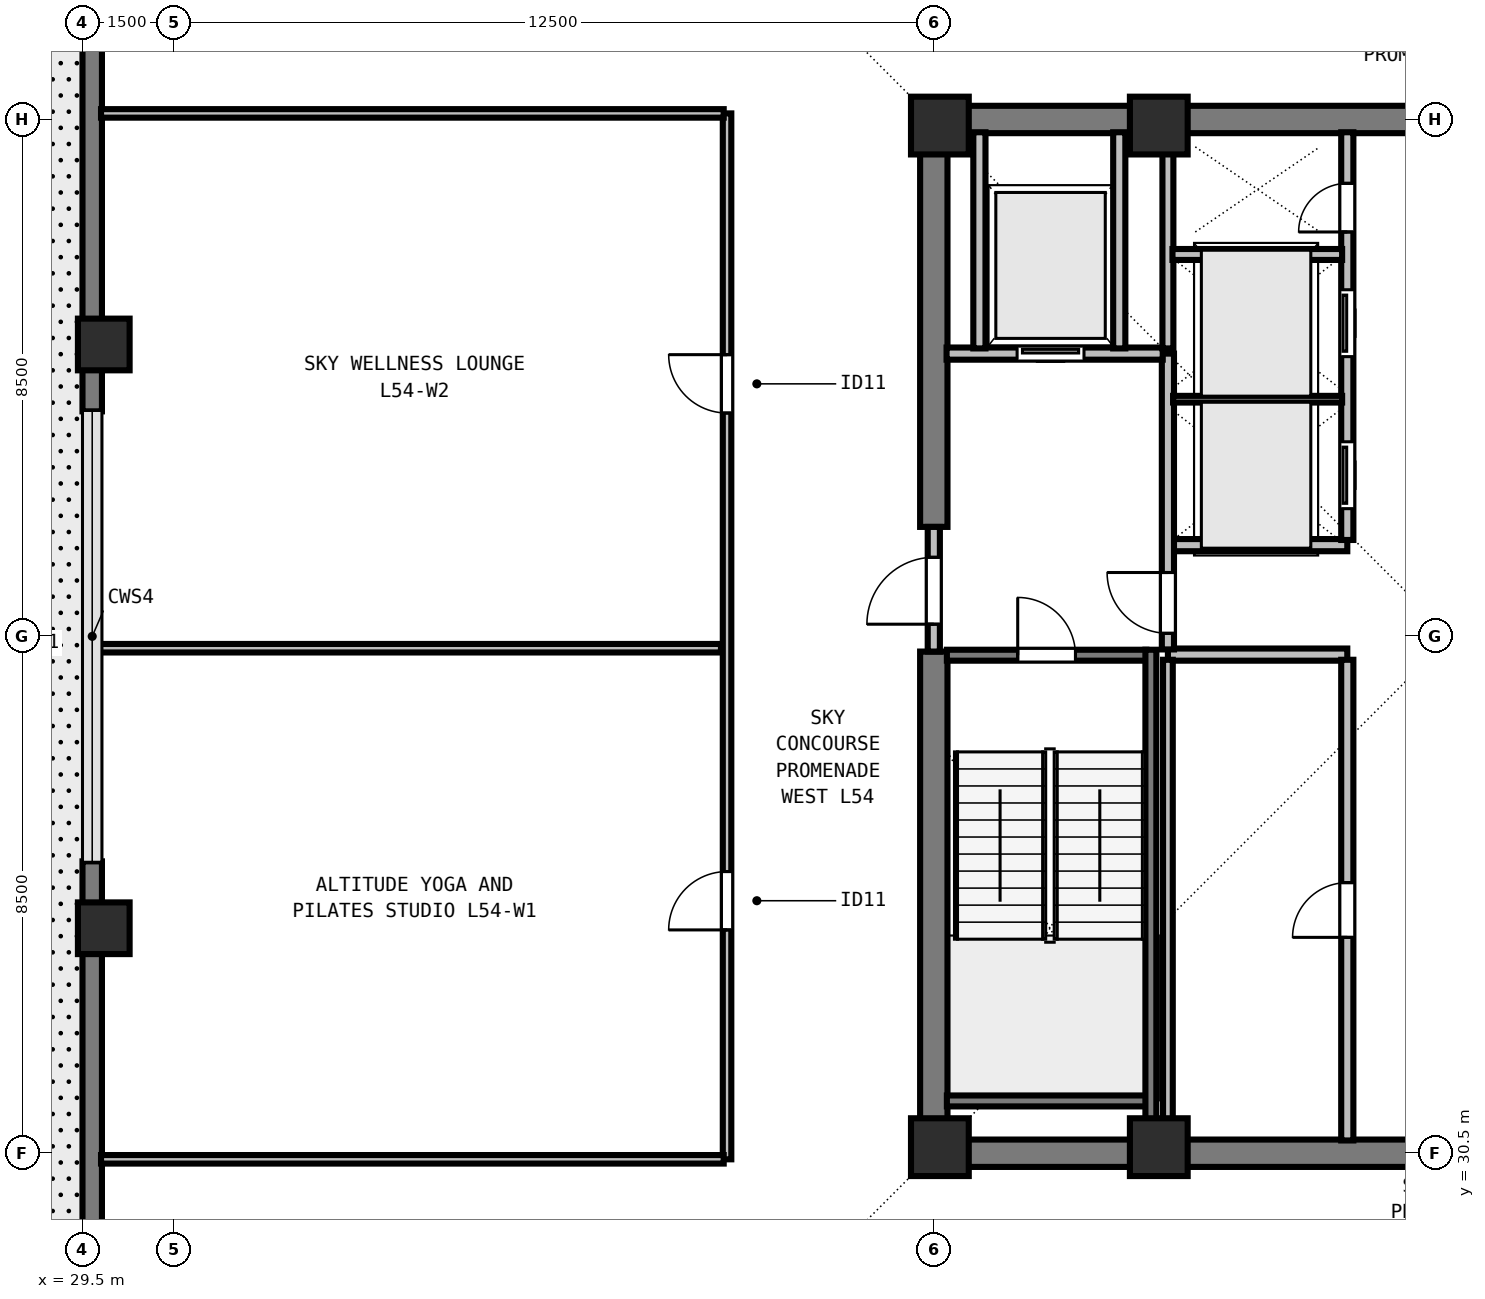
"""IFC4 building model, lengths in metres.
Left out: names, types, materials, properties, quantities, classifications, styles, units other than length and angle.
Written with IfcOpenShell. Run it as: python <this file> out.ifc"""

import sys

from ifc_helpers import new_model, si_unit, direction, frame, frame_2d, origin, origin_2d, place, context, subcontext, project, spatial, rectangle, extrude, element, fill, save


model = new_model("IFC4")
c1 = context("Model", 3, precision=1e-05, world=origin(), true_north=direction((0.0, 1.0)))
c2 = subcontext(c1, "Body", "Model", "MODEL_VIEW")
j1 = project(units=[si_unit("LENGTHUNIT", "METRE"), si_unit("PLANEANGLEUNIT", "RADIAN")], contexts=[c1])
p1 = place(None, origin())
s1 = spatial("IfcSite", under=j1, at=p1, CompositionType="ELEMENT")
p2 = place(p1, origin())
s2 = spatial("IfcBuilding", under=s1, at=p2, CompositionType="ELEMENT")
p3 = place(p2, frame((0.0, 0.0, 198.0)))
s3 = spatial("IfcBuildingStorey", under=s2, at=p3, CompositionType="ELEMENT", Elevation=198.0)
for number, where, z_axis, x_axis in (
    (1, (43.6, 30.6, 0.0), (0.0, 0.0, 1.0), (1.0, 0.0, 0.0)),
    (2, (47.2, 30.6, 0.0), (0.0, 0.0, 1.0), (1.0, 0.0, 0.0)),
    (3, (43.6, 47.4, 0.0), (0.0, 0.0, 1.0), (1.0, 0.0, 0.0)),
    (4, (47.2, 47.4, 0.0), (0.0, 0.0, 1.0), (1.0, 0.0, 0.0)),
):
    element("IfcColumn", number, at=place(p3, frame(where, z_axis=z_axis, x_axis=x_axis)), inside=s3, PredefinedType="COLUMN", context=c2, shape_type="SweptSolid", body=[
        extrude(rectangle(XDim=0.95, YDim=0.95, at=origin_2d()), origin(), (0.0, 0.0, 1.0), 4.5),
    ])
for number, where, z_axis, x_axis in (
    (5, (29.85, 43.8, 0.0), (0.0, 0.0, 1.0), (0.0, 1.0, 0.0)),
    (6, (29.85, 34.2, 0.0), (0.0, 0.0, 1.0), (0.0, 1.0, 0.0)),
):
    element("IfcColumn", number, at=place(p3, frame(where, z_axis=z_axis, x_axis=x_axis)), inside=s3, PredefinedType="COLUMN", context=c2, shape_type="SweptSolid", body=[
        extrude(rectangle(XDim=0.85, YDim=0.85, at=origin_2d()), origin(), (0.0, 0.0, 1.0), 4.5),
    ])
p4 = place(p3, frame((29.66, 21.5, 0.0), z_axis=(0.0, 0.0, 1.0), x_axis=(0.0, 1.0, 0.0)))
e7 = element("IfcWall", 7, at=p4, inside=s3, PredefinedType="SOLIDWALL", context=c2, shape_type="SweptSolid", body=[
    extrude(rectangle(XDim=13.8, YDim=0.32, at=frame_2d((6.9, 0.0))), origin(), (0.0, 0.0, 1.0), 4.29),
])
p5 = place(p4, frame((6.2, 0.0, 0.8)))
e8 = element("IfcOpeningElement", 8, at=p5, cuts=e7, PredefinedType="OPENING", context=c2, shape_type="SweptSolid", body=[
    extrude(rectangle(XDim=1.55, YDim=1.8, at=frame_2d((0.775, 0.9))), frame((0.0, 0.17, 0.0), z_axis=(0.0, -1.0, 0.0), x_axis=(1.0, 0.0, 0.0)), (0.0, 0.0, 1.0), 0.34),
])
p6 = place(p3, frame((29.66, 42.7, 0.0), z_axis=(0.0, 0.0, 1.0), x_axis=(0.0, 1.0, 0.0)))
e9 = element("IfcWall", 9, at=p6, inside=s3, PredefinedType="SOLIDWALL", context=c2, shape_type="SweptSolid", body=[
    extrude(rectangle(XDim=13.502, YDim=0.32, at=frame_2d((6.751, 0.0))), origin(), (0.0, 0.0, 1.0), 4.29),
])
p7 = place(p6, frame((6.051, 0.0, 0.8)))
e10 = element("IfcOpeningElement", 10, at=p7, cuts=e9, PredefinedType="OPENING", context=c2, shape_type="SweptSolid", body=[
    extrude(rectangle(XDim=1.55, YDim=1.8, at=frame_2d((0.775, 0.9))), frame((0.0, 0.17, 0.0), z_axis=(0.0, -1.0, 0.0), x_axis=(1.0, 0.0, 0.0)), (0.0, 0.0, 1.0), 0.34),
])
for number, where, z_axis, x_axis in (
    (11, (43.275, 30.5, 0.0), (0.0, 0.0, 1.0), (1.0, 0.0, 0.0)),
    (12, (43.275, 47.5, 0.0), (0.0, 0.0, 1.0), (1.0, 0.0, 0.0)),
):
    element("IfcWall", number, at=place(p3, frame(where, z_axis=z_axis, x_axis=x_axis)), inside=s3, PredefinedType="SHEAR", context=c2, shape_type="SweptSolid", body=[
        extrude(rectangle(XDim=17.45, YDim=0.45, at=frame_2d((8.725, 0.0))), origin(), (0.0, 0.0, 1.0), 4.29),
    ])
p8 = place(p3, frame((43.5, 30.715, 0.0), z_axis=(0.0, 0.0, 1.0), x_axis=(0.0, 1.0, 0.0)))
e13 = element("IfcWall", 13, at=p8, inside=s3, PredefinedType="SHEAR", context=c2, shape_type="SweptSolid", body=[
    extrude(rectangle(XDim=8.035, YDim=0.45, at=frame_2d((4.018, 0.0))), origin(), (0.0, 0.0, 1.0), 4.29),
])
p9 = place(p3, frame((43.5, 40.8, 0.0), z_axis=(0.0, 0.0, 1.0), x_axis=(0.0, 1.0, 0.0)))
e14 = element("IfcWall", 14, at=p9, inside=s3, PredefinedType="SHEAR", context=c2, shape_type="SweptSolid", body=[
    extrude(rectangle(XDim=6.485, YDim=0.45, at=frame_2d((3.242, 0.0))), origin(), (0.0, 0.0, 1.0), 4.29),
])
for number, where, z_axis, x_axis in (
    (15, (47.35, 38.7, 0.0), (0.0, 0.0, 1.0), (1.0, 0.0, 0.0)),
    (16, (47.35, 40.5, 0.0), (0.0, 0.0, 1.0), (1.0, 0.0, 0.0)),
):
    element("IfcWall", number, at=place(p3, frame(where, z_axis=z_axis, x_axis=x_axis)), inside=s3, PredefinedType="SOLIDWALL", context=c2, shape_type="SweptSolid", body=[
        extrude(rectangle(XDim=2.95, YDim=0.2, at=frame_2d((1.475, 0.0))), origin(), (0.0, 0.0, 1.0), 4.29),
    ])
p10 = place(p3, frame((50.3, 30.71, 0.0), z_axis=(0.0, 0.0, 1.0), x_axis=(0.0, 1.0, 0.0)))
e17 = element("IfcWall", 17, at=p10, inside=s3, PredefinedType="SOLIDWALL", context=c2, shape_type="SweptSolid", body=[
    extrude(rectangle(XDim=7.905, YDim=0.2, at=frame_2d((3.953, 0.0))), origin(), (0.0, 0.0, 1.0), 4.29),
])
p11 = place(p10, frame((3.34, 0.0, 0.0)))
e18 = element("IfcOpeningElement", 18, at=p11, cuts=e17, PredefinedType="OPENING", context=c2, shape_type="SweptSolid", body=[
    extrude(rectangle(XDim=0.9, YDim=2.12, at=frame_2d((0.45, 1.06))), frame((0.0, 0.11, 0.0), z_axis=(0.0, -1.0, 0.0), x_axis=(1.0, 0.0, 0.0)), (0.0, 0.0, 1.0), 0.22),
])
p12 = place(p3, frame((50.3, 40.585, 0.0), z_axis=(0.0, 0.0, 1.0), x_axis=(0.0, 1.0, 0.0)))
e19 = element("IfcWall", 19, at=p12, inside=s3, PredefinedType="SOLIDWALL", context=c2, shape_type="SweptSolid", body=[
    extrude(rectangle(XDim=6.705, YDim=0.2, at=frame_2d((3.353, 0.0))), origin(), (0.0, 0.0, 1.0), 4.29),
])
p13 = place(p12, frame((0.515, 0.0, 0.0)))
e20 = element("IfcOpeningElement", 20, at=p13, cuts=e19, PredefinedType="OPENING", context=c2, shape_type="SweptSolid", body=[
    extrude(rectangle(XDim=1.1, YDim=2.2, at=frame_2d((0.55, 1.1))), frame((0.0, 0.11, 0.0), z_axis=(0.0, -1.0, 0.0), x_axis=(1.0, 0.0, 0.0)), (0.0, 0.0, 1.0), 0.22),
])
p14 = place(p12, frame((3.015, 0.0, 0.0)))
e21 = element("IfcOpeningElement", 21, at=p14, cuts=e19, PredefinedType="OPENING", context=c2, shape_type="SweptSolid", body=[
    extrude(rectangle(XDim=1.1, YDim=2.2, at=frame_2d((0.55, 1.1))), frame((0.0, 0.11, 0.0), z_axis=(0.0, -1.0, 0.0), x_axis=(1.0, 0.0, 0.0)), (0.0, 0.0, 1.0), 0.22),
])
p15 = place(p12, frame((5.065, 0.0, 0.0)))
e22 = element("IfcOpeningElement", 22, at=p15, cuts=e19, PredefinedType="OPENING", context=c2, shape_type="SweptSolid", body=[
    extrude(rectangle(XDim=0.8, YDim=2.08, at=frame_2d((0.4, 1.04))), frame((0.0, 0.11, 0.0), z_axis=(0.0, -1.0, 0.0), x_axis=(1.0, 0.0, 0.0)), (0.0, 0.0, 1.0), 0.22),
])
p16 = place(p3, frame((43.5, 38.75, 0.0), z_axis=(0.0, 0.0, 1.0), x_axis=(0.0, 1.0, 0.0)))
e23 = element("IfcWall", 23, at=p16, inside=s3, PredefinedType="SOLIDWALL", context=c2, shape_type="SweptSolid", body=[
    extrude(rectangle(XDim=2.05, YDim=0.2, at=frame_2d((1.025, 0.0))), origin(), (0.0, 0.0, 1.0), 4.29),
])
p17 = place(p16, frame((0.45, 0.0, 0.0)))
e24 = element("IfcOpeningElement", 24, at=p17, cuts=e23, PredefinedType="OPENING", context=c2, shape_type="SweptSolid", body=[
    extrude(rectangle(XDim=1.1, YDim=2.15, at=frame_2d((0.55, 1.075))), frame((0.0, 0.11, 0.0), z_axis=(0.0, -1.0, 0.0), x_axis=(1.0, 0.0, 0.0)), (0.0, 0.0, 1.0), 0.22),
])
p18 = place(p3, frame((47.35, 38.785, 0.0), z_axis=(0.0, 0.0, 1.0), x_axis=(0.0, 1.0, 0.0)))
e25 = element("IfcWall", 25, at=p18, inside=s3, PredefinedType="SOLIDWALL", context=c2, shape_type="SweptSolid", body=[
    extrude(rectangle(XDim=4.865, YDim=0.2, at=frame_2d((2.433, 0.0))), origin(), (0.0, 0.0, 1.0), 4.29),
])
p19 = place(p18, frame((0.265, 0.0, 0.0)))
e26 = element("IfcOpeningElement", 26, at=p19, cuts=e25, PredefinedType="OPENING", context=c2, shape_type="SweptSolid", body=[
    extrude(rectangle(XDim=1.0, YDim=2.15, at=frame_2d((0.5, 1.075))), frame((0.0, 0.11, 0.0), z_axis=(0.0, -1.0, 0.0), x_axis=(1.0, 0.0, 0.0)), (0.0, 0.0, 1.0), 0.22),
])
p20 = place(p3, frame((43.71, 43.65, 0.0), z_axis=(0.0, 0.0, 1.0), x_axis=(1.0, 0.0, 0.0)))
e27 = element("IfcWall", 27, at=p20, inside=s3, PredefinedType="SOLIDWALL", context=c2, shape_type="SweptSolid", body=[
    extrude(rectangle(XDim=3.555, YDim=0.2, at=frame_2d((1.777, 0.0))), origin(), (0.0, 0.0, 1.0), 4.29),
])
p21 = place(p20, frame((1.16, 0.0, 0.0)))
e28 = element("IfcOpeningElement", 28, at=p21, cuts=e27, PredefinedType="OPENING", context=c2, shape_type="SweptSolid", body=[
    extrude(rectangle(XDim=1.1, YDim=2.2, at=frame_2d((0.55, 1.1))), frame((0.0, 0.11, 0.0), z_axis=(0.0, -1.0, 0.0), x_axis=(1.0, 0.0, 0.0)), (0.0, 0.0, 1.0), 0.22),
])
for number, where, z_axis, x_axis in (
    (29, (46.55, 43.735, 0.0), (0.0, 0.0, 1.0), (0.0, 1.0, 0.0)),
    (30, (44.25, 43.735, 0.0), (0.0, 0.0, 1.0), (0.0, 1.0, 0.0)),
):
    element("IfcWall", number, at=place(p3, frame(where, z_axis=z_axis, x_axis=x_axis)), inside=s3, PredefinedType="SOLIDWALL", context=c2, shape_type="SweptSolid", body=[
        extrude(rectangle(XDim=3.555, YDim=0.2, at=frame_2d((1.777, 0.0))), origin(), (0.0, 0.0, 1.0), 4.29),
    ])
p22 = place(p3, frame((47.35, 30.71, 0.0), z_axis=(0.0, 0.0, 1.0), x_axis=(0.0, 1.0, 0.0)))
e31 = element("IfcWall", 31, at=p22, inside=s3, PredefinedType="PARTITIONING", context=c2, shape_type="SweptSolid", body=[
    extrude(rectangle(XDim=7.905, YDim=0.16, at=frame_2d((3.953, 0.0))), origin(), (0.0, 0.0, 1.0), 4.29),
])
p23 = place(p3, frame((47.35, 43.735, 0.0), z_axis=(0.0, 0.0, 1.0), x_axis=(0.0, 1.0, 0.0)))
e32 = element("IfcWall", 32, at=p23, inside=s3, PredefinedType="SOLIDWALL", context=c2, shape_type="SweptSolid", body=[
    extrude(rectangle(XDim=3.555, YDim=0.18, at=frame_2d((1.777, 0.0))), origin(), (0.0, 0.0, 1.0), 4.29),
])
p24 = place(p3, frame((47.435, 42.9, 0.0), z_axis=(0.0, 0.0, 1.0), x_axis=(1.0, 0.0, 0.0)))
e33 = element("IfcWall", 33, at=p24, inside=s3, PredefinedType="PARTITIONING", context=c2, shape_type="SweptSolid", body=[
    extrude(rectangle(XDim=2.78, YDim=0.11, at=frame_2d((1.39, 0.0))), origin(), (0.0, 0.0, 1.0), 4.29),
])
p25 = place(p3, frame((47.425, 45.28, 0.0), z_axis=(0.0, 0.0, 1.0), x_axis=(1.0, 0.0, 0.0)))
e34 = element("IfcWall", 34, at=p25, inside=s3, PredefinedType="SOLIDWALL", context=c2, shape_type="SweptSolid", body=[
    extrude(rectangle(XDim=2.79, YDim=0.18, at=frame_2d((1.395, 0.0))), origin(), (0.0, 0.0, 1.0), 4.29),
])
p26 = place(p3, frame((40.1, 30.4, 0.0), z_axis=(0.0, 0.0, 1.0), x_axis=(0.0, 1.0, 0.0)))
e35 = element("IfcWall", 35, at=p26, inside=s3, PredefinedType="PARTITIONING", context=c2, shape_type="SweptSolid", body=[
    extrude(rectangle(XDim=17.2, YDim=0.14, at=frame_2d((8.6, 0.0))), origin(), (0.0, 0.0, 1.0), 4.29),
])
p27 = place(p26, frame((3.772, 0.0, 0.0)))
e36 = element("IfcOpeningElement", 36, at=p27, cuts=e35, PredefinedType="OPENING", context=c2, shape_type="SweptSolid", body=[
    extrude(rectangle(XDim=0.96, YDim=2.12, at=frame_2d((0.48, 1.06))), frame((0.0, 0.08, 0.0), z_axis=(0.0, -1.0, 0.0), x_axis=(1.0, 0.0, 0.0)), (0.0, 0.0, 1.0), 0.16),
])
p28 = place(p26, frame((12.272, 0.0, 0.0)))
e37 = element("IfcOpeningElement", 37, at=p28, cuts=e35, PredefinedType="OPENING", context=c2, shape_type="SweptSolid", body=[
    extrude(rectangle(XDim=0.96, YDim=2.12, at=frame_2d((0.48, 1.06))), frame((0.0, 0.08, 0.0), z_axis=(0.0, -1.0, 0.0), x_axis=(1.0, 0.0, 0.0)), (0.0, 0.0, 1.0), 0.16),
])
for number, where, z_axis, x_axis in (
    (38, (29.805, 30.4, 0.0), (0.0, 0.0, 1.0), (1.0, 0.0, 0.0)),
    (39, (29.805, 47.6, 0.0), (0.0, 0.0, 1.0), (1.0, 0.0, 0.0)),
):
    element("IfcWall", number, at=place(p3, frame(where, z_axis=z_axis, x_axis=x_axis)), inside=s3, PredefinedType="PARTITIONING", context=c2, shape_type="SweptSolid", body=[
        extrude(rectangle(XDim=10.24, YDim=0.14, at=frame_2d((5.12, 0.0))), origin(), (0.0, 0.0, 1.0), 4.29),
    ])
p29 = place(p3, frame((29.67, 38.805, 0.0), z_axis=(0.0, 0.0, 1.0), x_axis=(1.0, 0.0, 0.0)))
e40 = element("IfcWall", 40, at=p29, inside=s3, PredefinedType="PARTITIONING", context=c2, shape_type="SweptSolid", body=[
    extrude(rectangle(XDim=10.33, YDim=0.14, at=frame_2d((5.165, 0.0))), origin(), (0.0, 0.0, 1.0), 3.958),
])
p30 = place(p3, frame((43.715, 38.69, 0.0), z_axis=(0.0, 0.0, 1.0), x_axis=(1.0, 0.0, 0.0)))
e41 = element("IfcWall", 41, at=p30, inside=s3, PredefinedType="SOLIDWALL", context=c2, shape_type="SweptSolid", body=[
    extrude(rectangle(XDim=3.28, YDim=0.18, at=frame_2d((1.64, 0.0))), origin(), (0.0, 0.0, 1.0), 4.29),
])
p31 = place(p30, frame((1.165, 0.0, 0.0)))
e42 = element("IfcOpeningElement", 42, at=p31, cuts=e41, PredefinedType="OPENING", context=c2, shape_type="SweptSolid", body=[
    extrude(rectangle(XDim=0.95, YDim=2.15, at=frame_2d((0.475, 1.075))), frame((0.0, 0.1, 0.0), z_axis=(0.0, -1.0, 0.0), x_axis=(1.0, 0.0, 0.0)), (0.0, 0.0, 1.0), 0.2),
])
p32 = place(p3, frame((43.715, 31.36, 0.0), z_axis=(0.0, 0.0, 1.0), x_axis=(1.0, 0.0, 0.0)))
e43 = element("IfcWall", 43, at=p32, inside=s3, PredefinedType="SOLIDWALL", context=c2, shape_type="SweptSolid", body=[
    extrude(rectangle(XDim=3.28, YDim=0.18, at=frame_2d((1.64, 0.0))), origin(), (0.0, 0.0, 1.0), 4.29),
])
p33 = place(p3, frame((47.07, 38.78, 0.0), z_axis=(0.0, 0.0, 1.0), x_axis=(0.0, -1.0, 0.0)))
e44 = element("IfcWall", 44, at=p33, inside=s3, PredefinedType="SOLIDWALL", context=c2, shape_type="SweptSolid", body=[
    extrude(rectangle(XDim=8.067, YDim=0.18, at=frame_2d((4.034, 0.0))), origin(), (0.0, 0.0, 1.0), 4.29),
])
p34 = place(p17, origin())
e45 = element("IfcDoor", 45, at=p34, inside=s3, OperationType="SINGLE_SWING_LEFT", PredefinedType="DOOR", context=c2, shape_type="SweptSolid", body=[
    extrude(rectangle(XDim=1.1, YDim=2.15, at=frame_2d((0.55, 1.075))), frame((0.0, 0.025, 0.0), z_axis=(0.0, -1.0, 0.0), x_axis=(1.0, 0.0, 0.0)), (0.0, 0.0, 1.0), 0.05),
])
fill(e24, e45)
p35 = place(p19, origin())
e46 = element("IfcDoor", 46, at=p35, inside=s3, OperationType="SINGLE_SWING_RIGHT", PredefinedType="DOOR", context=c2, shape_type="SweptSolid", body=[
    extrude(rectangle(XDim=1.0, YDim=2.15, at=frame_2d((0.5, 1.075))), frame((0.0, 0.025, 0.0), z_axis=(0.0, -1.0, 0.0), x_axis=(1.0, 0.0, 0.0)), (0.0, 0.0, 1.0), 0.05),
])
fill(e26, e46)
p36 = place(p21, origin())
e47 = element("IfcDoor", 47, at=p36, inside=s3, OperationType="SLIDING_TO_LEFT", PredefinedType="DOOR", context=c2, shape_type="SweptSolid", body=[
    extrude(rectangle(XDim=1.1, YDim=2.2, at=frame_2d((0.55, 1.1))), frame((0.0, 0.025, 0.0), z_axis=(0.0, -1.0, 0.0), x_axis=(1.0, 0.0, 0.0)), (0.0, 0.0, 1.0), 0.05),
])
fill(e28, e47)
p37 = place(p11, origin())
e48 = element("IfcDoor", 48, at=p37, inside=s3, OperationType="SINGLE_SWING_LEFT", PredefinedType="DOOR", context=c2, shape_type="SweptSolid", body=[
    extrude(rectangle(XDim=0.9, YDim=2.12, at=frame_2d((0.45, 1.06))), frame((0.0, 0.025, 0.0), z_axis=(0.0, -1.0, 0.0), x_axis=(1.0, 0.0, 0.0)), (0.0, 0.0, 1.0), 0.05),
])
fill(e18, e48)
p38 = place(p13, origin())
e49 = element("IfcDoor", 49, at=p38, inside=s3, OperationType="SLIDING_TO_LEFT", PredefinedType="DOOR", context=c2, shape_type="SweptSolid", body=[
    extrude(rectangle(XDim=1.1, YDim=2.2, at=frame_2d((0.55, 1.1))), frame((0.0, 0.025, 0.0), z_axis=(0.0, -1.0, 0.0), x_axis=(1.0, 0.0, 0.0)), (0.0, 0.0, 1.0), 0.05),
])
fill(e20, e49)
p39 = place(p14, origin())
e50 = element("IfcDoor", 50, at=p39, inside=s3, OperationType="SLIDING_TO_LEFT", PredefinedType="DOOR", context=c2, shape_type="SweptSolid", body=[
    extrude(rectangle(XDim=1.1, YDim=2.2, at=frame_2d((0.55, 1.1))), frame((0.0, 0.025, 0.0), z_axis=(0.0, -1.0, 0.0), x_axis=(1.0, 0.0, 0.0)), (0.0, 0.0, 1.0), 0.05),
])
fill(e21, e50)
p40 = place(p15, origin())
e51 = element("IfcDoor", 51, at=p40, inside=s3, OperationType="SINGLE_SWING_LEFT", PredefinedType="DOOR", context=c2, shape_type="SweptSolid", body=[
    extrude(rectangle(XDim=0.8, YDim=2.08, at=frame_2d((0.4, 1.04))), frame((0.0, 0.025, 0.0), z_axis=(0.0, -1.0, 0.0), x_axis=(1.0, 0.0, 0.0)), (0.0, 0.0, 1.0), 0.05),
])
fill(e22, e51)
p41 = place(p27, origin())
e52 = element("IfcDoor", 52, at=p41, inside=s3, OperationType="SINGLE_SWING_LEFT", PredefinedType="DOOR", context=c2, shape_type="SweptSolid", body=[
    extrude(rectangle(XDim=0.96, YDim=2.12, at=frame_2d((0.48, 1.06))), frame((0.0, 0.025, 0.0), z_axis=(0.0, -1.0, 0.0), x_axis=(1.0, 0.0, 0.0)), (0.0, 0.0, 1.0), 0.05),
])
fill(e36, e52)
p42 = place(p28, origin())
e53 = element("IfcDoor", 53, at=p42, inside=s3, OperationType="SINGLE_SWING_RIGHT", PredefinedType="DOOR", context=c2, shape_type="SweptSolid", body=[
    extrude(rectangle(XDim=0.96, YDim=2.12, at=frame_2d((0.48, 1.06))), frame((0.0, 0.025, 0.0), z_axis=(0.0, -1.0, 0.0), x_axis=(1.0, 0.0, 0.0)), (0.0, 0.0, 1.0), 0.05),
])
fill(e37, e53)
p43 = place(p31, origin())
e54 = element("IfcDoor", 54, at=p43, inside=s3, OperationType="SINGLE_SWING_LEFT", PredefinedType="DOOR", context=c2, shape_type="SweptSolid", body=[
    extrude(rectangle(XDim=0.95, YDim=2.15, at=frame_2d((0.475, 1.075))), frame((0.0, 0.025, 0.0), z_axis=(0.0, -1.0, 0.0), x_axis=(1.0, 0.0, 0.0)), (0.0, 0.0, 1.0), 0.05),
])
fill(e42, e54)
save(model, sys.argv[1])
